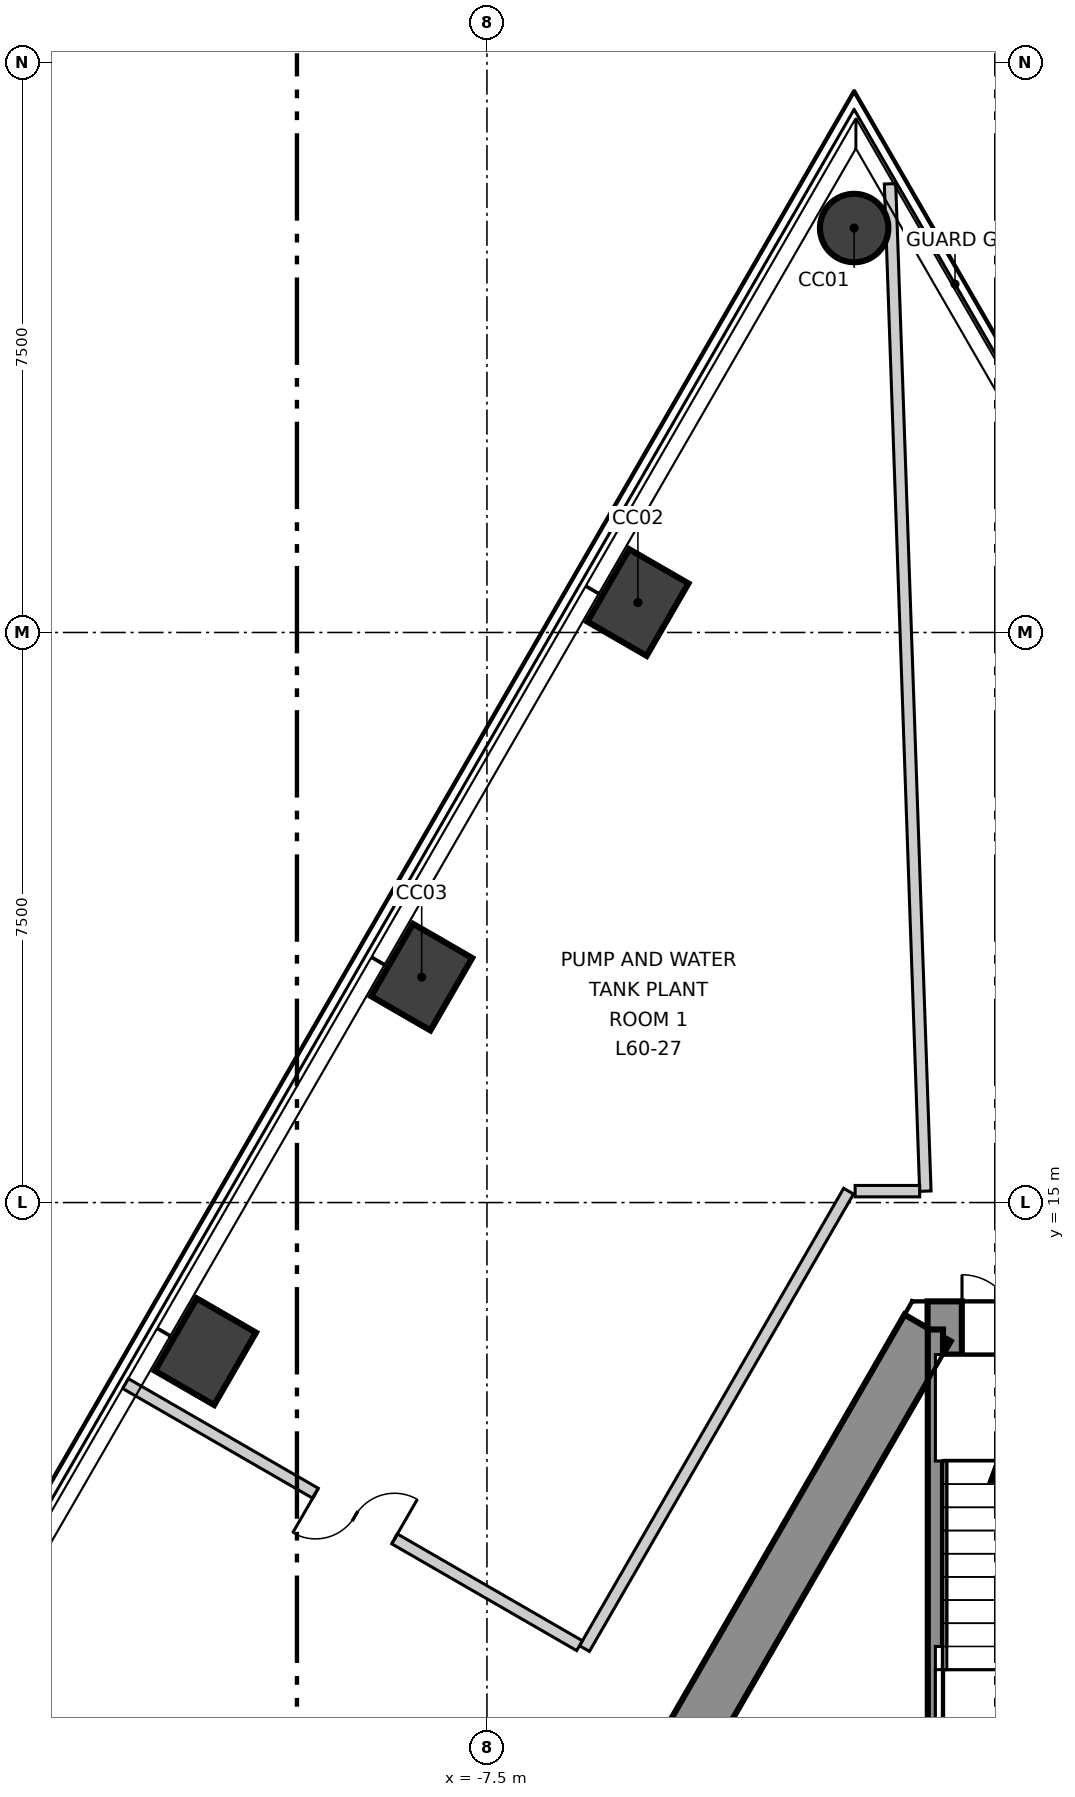
"""IFC4 building model, lengths in metres.
Left out: names, types, materials, properties, quantities, classifications, styles, units other than length and angle.
Written with IfcOpenShell. Run it as: python <this file> out.ifc"""

import sys

from ifc_helpers import new_model, si_unit, direction, frame, frame_2d, origin, origin_2d, place, context, subcontext, project, spatial, polyline, rectangle, circle, outline, extrude, element, fill, save


model = new_model("IFC4")
c1 = context("Model", 3, precision=1e-05, world=origin(), true_north=direction((0.0, 1.0)))
c2 = subcontext(c1, "Body", "Model", "MODEL_VIEW")
j1 = project(units=[si_unit("LENGTHUNIT", "METRE"), si_unit("PLANEANGLEUNIT", "RADIAN")], contexts=[c1])
p1 = place(None, origin())
s1 = spatial("IfcSite", under=j1, at=p1, CompositionType="ELEMENT")
p2 = place(p1, origin())
s2 = spatial("IfcBuilding", under=s1, at=p2, CompositionType="ELEMENT")
p3 = place(p2, frame((0.0, 0.0, 255.8)))
s3 = spatial("IfcBuildingStorey", under=s2, at=p3, CompositionType="ELEMENT", Elevation=255.8)
p4 = place(p3, frame((1.703, 13.35, -0.6), z_axis=(0.0, 0.0, 1.0), x_axis=(-1.0, 0.0, 0.0)))
e1 = element("IfcWall", 1, at=p4, inside=s3, PredefinedType="SHEAR", context=c2, shape_type="SweptSolid", body=[
    extrude(outline(polyline([(-0.202, -0.35), (1.703, -0.35), (3.608, -0.35), (3.204, 0.35), (1.703, 0.35), (0.202, 0.35), (-0.202, -0.35)])), origin(), (0.0, 0.0, 1.0), 6.3),
])
p5 = place(p4, frame((1.553, 0.0, 0.6)))
e2 = element("IfcOpeningElement", 2, at=p5, cuts=e1, PredefinedType="OPENING", context=c2, shape_type="SweptSolid", body=[
    extrude(rectangle(XDim=1.4, YDim=2.1, at=frame_2d((0.7, 1.05))), frame((0.0, 0.36, 0.0), z_axis=(0.0, -1.0, 0.0), x_axis=(1.0, 0.0, 0.0)), (0.0, 0.0, 1.0), 0.72),
])
p6 = place(p3, frame((-1.703, 13.35, -0.6), z_axis=(0.0, 0.0, 1.0), x_axis=(-0.500011533395, -0.866018744874, 0.0)))
e3 = element("IfcWall", 3, at=p6, inside=s3, PredefinedType="SHEAR", context=c2, shape_type="SweptSolid", body=[
    extrude(outline(polyline([(-0.202, -0.35), (1.782, -0.35), (3.766, -0.35), (5.75, -0.35), (7.734, -0.35), (9.718, -0.35), (11.702, -0.35), (13.686, -0.35), (15.67, -0.35), (17.654, -0.35), (19.638, -0.35), (21.622, -0.35), (21.218, 0.35), (19.307, 0.35), (17.397, 0.35), (15.486, 0.35), (13.576, 0.35), (11.665, 0.35), (9.755, 0.35), (7.844, 0.35), (5.934, 0.35), (4.023, 0.35), (2.113, 0.35), (0.202, 0.35), (-0.202, -0.35)])), origin(), (0.0, 0.0, 1.0), 6.3),
])
p7 = place(p6, frame((10.16, 0.0, 0.6)))
e4 = element("IfcOpeningElement", 4, at=p7, cuts=e3, PredefinedType="OPENING", context=c2, shape_type="SweptSolid", body=[
    extrude(rectangle(XDim=1.1, YDim=2.1, at=frame_2d((0.55, 1.05))), frame((0.0, 0.36, 0.0), z_axis=(0.0, -1.0, 0.0), x_axis=(1.0, 0.0, 0.0)), (0.0, 0.0, 1.0), 0.72),
])
p8 = place(p3, frame((-2.669, 27.821, -0.6), z_axis=(0.0, 0.0, 1.0), x_axis=(0.5, 0.866025403784, 0.0)))
e5 = element("IfcColumn", 5, at=p8, inside=s3, PredefinedType="COLUMN", context=c2, shape_type="SweptSolid", body=[
    extrude(circle(Radius=0.45, at=origin_2d()), origin(), (0.0, 0.0, 1.0), 6.3),
])
for number, where, z_axis, x_axis in (
    (6, (-5.514, 22.894, -0.6), (0.0, 0.0, 1.0), (0.5, 0.866, 0.0)),
    (7, (-8.359, 17.966, -0.6), (0.0, 0.0, 1.0), (0.5, 0.866, 0.0)),
    (8, (-11.204, 13.038, -0.6), (0.0, 0.0, 1.0), (0.5, 0.866, 0.0)),
):
    element("IfcColumn", number, at=place(p3, frame(where, z_axis=z_axis, x_axis=x_axis)), inside=s3, PredefinedType="COLUMN", context=c2, shape_type="SweptSolid", body=[
        extrude(rectangle(XDim=1.1, YDim=0.9, at=origin_2d()), origin(), (0.0, 0.0, 1.0), 6.3),
    ])
p9 = place(p3, frame((-6.217, 9.132, 0.0), z_axis=(0.0, 0.0, 1.0), x_axis=(0.500076232498, 0.865981386458, 0.0)))
e9 = element("IfcWall", 9, at=p9, inside=s3, PredefinedType="PARTITIONING", context=c2, shape_type="SweptSolid", body=[
    extrude(rectangle(XDim=6.949, YDim=0.15, at=frame_2d((3.475, 0.0))), origin(), (0.0, 0.0, 1.0), 5.7),
])
p10 = place(p3, frame((-2.197, 28.403, 0.0), z_axis=(0.0, 0.0, 1.0), x_axis=(0.035070978902, -0.999384823999, 0.0)))
e10 = element("IfcWall", 10, at=p10, inside=s3, PredefinedType="PARTITIONING", context=c2, shape_type="SweptSolid", body=[
    extrude(rectangle(XDim=13.261, YDim=0.15, at=frame_2d((6.631, 0.0))), origin(), (0.0, 0.0, 1.0), 5.1),
])
p11 = place(p3, frame((-2.656, 15.15, 0.0), z_axis=(0.0, 0.0, 1.0), x_axis=(1.0, 0.0, 0.0)))
e11 = element("IfcWall", 11, at=p11, inside=s3, PredefinedType="PARTITIONING", context=c2, shape_type="SweptSolid", body=[
    extrude(rectangle(XDim=0.849, YDim=0.15, at=frame_2d((0.425, 0.0))), origin(), (0.0, 0.0, 1.0), 5.7),
])
p12 = place(p3, frame((-12.255, 12.618, 0.0), z_axis=(0.0, 0.0, 1.0), x_axis=(0.866054133163, -0.499950235956, 0.0)))
e12 = element("IfcWall", 12, at=p12, inside=s3, PredefinedType="PARTITIONING", context=c2, shape_type="SweptSolid", body=[
    extrude(rectangle(XDim=6.897, YDim=0.15, at=frame_2d((3.448, 0.0))), origin(), (0.0, 0.0, 1.0), 5.7),
])
p13 = place(p12, frame((2.886, 0.0, 0.0)))
e13 = element("IfcOpeningElement", 13, at=p13, cuts=e12, PredefinedType="OPENING", context=c2, shape_type="SweptSolid", body=[
    extrude(rectangle(XDim=1.2, YDim=2.1, at=frame_2d((0.6, 1.05))), frame((0.0, 0.085, 0.0), z_axis=(0.0, -1.0, 0.0), x_axis=(1.0, 0.0, 0.0)), (0.0, 0.0, 1.0), 0.17),
])
p14 = place(p3, frame((-1.6, 6.615, 0.0), z_axis=(0.0, 0.0, 1.0), x_axis=(0.0, 1.0, 0.0)))
e14 = element("IfcWall", 14, at=p14, inside=s3, PredefinedType="SOLIDWALL", context=c2, shape_type="SweptSolid", body=[
    extrude(rectangle(XDim=6.715, YDim=0.2, at=frame_2d((3.357, 0.0))), origin(), (0.0, 0.0, 1.0), 5.7),
])
p15 = place(p13, origin())
e15 = element("IfcDoor", 15, at=p15, inside=s3, OperationType="DOUBLE_DOOR_SINGLE_SWING", PredefinedType="DOOR", context=c2, shape_type="SweptSolid", body=[
    extrude(rectangle(XDim=1.2, YDim=2.1, at=frame_2d((0.6, 1.05))), frame((0.0, 0.025, 0.0), z_axis=(0.0, -1.0, 0.0), x_axis=(1.0, 0.0, 0.0)), (0.0, 0.0, 1.0), 0.05),
])
fill(e13, e15)
p16 = place(p5, origin())
e16 = element("IfcDoor", 16, at=p16, inside=s3, OperationType="DOUBLE_DOOR_SINGLE_SWING", PredefinedType="DOOR", context=c2, shape_type="SweptSolid", body=[
    extrude(rectangle(XDim=1.4, YDim=2.1, at=frame_2d((0.7, 1.05))), frame((0.0, 0.025, 0.0), z_axis=(0.0, -1.0, 0.0), x_axis=(1.0, 0.0, 0.0)), (0.0, 0.0, 1.0), 0.05),
])
fill(e2, e16)
save(model, sys.argv[1])
